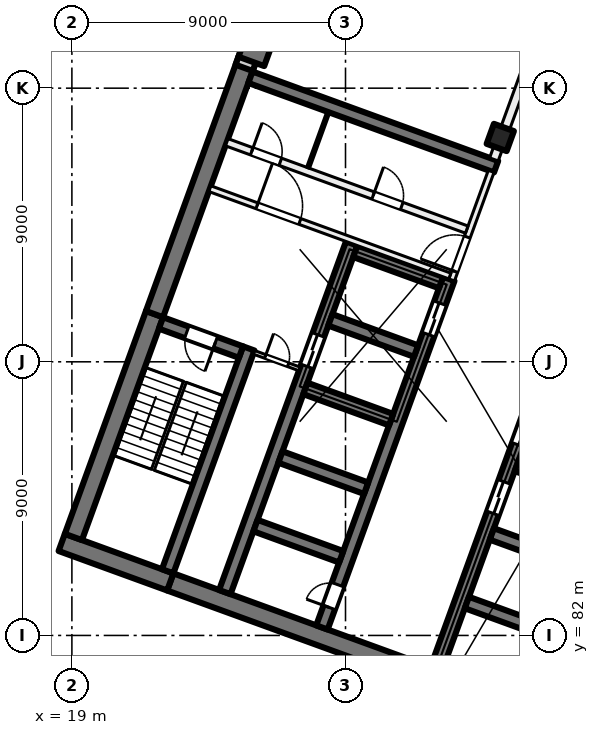
"""IFC4 building model, lengths in metres.
Left out: names, types, materials, properties, quantities, classifications, styles, units other than length and angle.
Written with IfcOpenShell. Run it as: python <this file> out.ifc"""

import sys

from ifc_helpers import new_model, si_unit, direction, frame, frame_2d, origin, origin_2d, place, context, subcontext, project, spatial, rectangle, extrude, element, fill, save


model = new_model("IFC4")
c1 = context("Model", 3, precision=1e-05, world=origin(), true_north=direction((0.0, 1.0)))
c2 = subcontext(c1, "Body", "Model", "MODEL_VIEW")
j1 = project(units=[si_unit("LENGTHUNIT", "METRE"), si_unit("PLANEANGLEUNIT", "RADIAN")], contexts=[c1])
p1 = place(None, origin())
s1 = spatial("IfcSite", under=j1, at=p1, CompositionType="ELEMENT")
p2 = place(p1, origin())
s2 = spatial("IfcBuilding", under=s1, at=p2, CompositionType="ELEMENT")
p3 = place(p2, frame((0.0, 0.0, 31.5)))
s3 = spatial("IfcBuildingStorey", under=s2, at=p3, CompositionType="ELEMENT", Elevation=31.5)
p4 = place(p3, frame((33.091, 98.379, 0.0), z_axis=(0.0, 0.0, 1.0), x_axis=(-0.342020143326, -0.939692620786, 0.0)))
e1 = element("IfcColumn", 1, at=p4, inside=s3, PredefinedType="COLUMN", context=c2, shape_type="SweptSolid", body=[
    extrude(rectangle(XDim=0.7, YDim=0.7, at=origin_2d()), origin(), (0.0, 0.0, 1.0), 4.0),
])
p5 = place(p3, frame((25.056, 101.303, 0.0), z_axis=(0.0, 0.0, 1.0), x_axis=(-0.342020143326, -0.939692620786, 0.0)))
e2 = element("IfcColumn", 2, at=p5, inside=s3, PredefinedType="COLUMN", context=c2, shape_type="SweptSolid", body=[
    extrude(rectangle(XDim=0.9, YDim=0.9, at=origin_2d()), origin(), (0.0, 0.0, 1.0), 4.0),
])
p6 = place(p3, frame((35.767, 78.835, 0.0), z_axis=(0.0, 0.0, 1.0), x_axis=(-0.939692894512, 0.342019391267, 0.0)))
e3 = element("IfcWall", 3, at=p6, inside=s3, PredefinedType="SHEAR", context=c2, shape_type="SweptSolid", body=[
    extrude(rectangle(XDim=14.4, YDim=0.6, at=frame_2d((7.2, 0.0))), origin(), (0.0, 0.0, 1.0), 4.0),
])
p7 = place(p3, frame((22.236, 83.76, 0.0), z_axis=(0.0, 0.0, 1.0), x_axis=(-0.939680822529, 0.342052557032, 0.0)))
e4 = element("IfcWall", 4, at=p7, inside=s3, PredefinedType="SHEAR", context=c2, shape_type="SweptSolid", body=[
    extrude(rectangle(XDim=3.8, YDim=0.6, at=frame_2d((1.9, 0.0))), origin(), (0.0, 0.0, 1.0), 4.0),
])
p8 = place(p3, frame((19.05, 85.239, 0.0), z_axis=(0.0, 0.0, 1.0), x_axis=(0.342016982193, 0.939693771338, 0.0)))
e5 = element("IfcWall", 5, at=p8, inside=s3, PredefinedType="SHEAR", context=c2, shape_type="SweptSolid", body=[
    extrude(rectangle(XDim=7.8, YDim=0.6, at=frame_2d((3.9, 0.0))), origin(), (0.0, 0.0, 1.0), 4.0),
])
p9 = place(p3, frame((21.717, 92.568, 0.0), z_axis=(0.0, 0.0, 1.0), x_axis=(0.342016162452, 0.939694069696, 0.0)))
e6 = element("IfcWall", 6, at=p9, inside=s3, PredefinedType="SHEAR", context=c2, shape_type="SweptSolid", body=[
    extrude(rectangle(XDim=8.9, YDim=0.6, at=frame_2d((4.45, 0.0))), origin(), (0.0, 0.0, 1.0), 4.0),
])
p10 = place(p3, frame((22.15, 84.11, 0.0), z_axis=(0.0, 0.0, 1.0), x_axis=(0.342016982193, 0.939693771338, 0.0)))
e7 = element("IfcWall", 7, at=p10, inside=s3, PredefinedType="SHEAR", context=c2, shape_type="SweptSolid", body=[
    extrude(rectangle(XDim=7.8, YDim=0.4, at=frame_2d((3.9, 0.0))), origin(), (0.0, 0.0, 1.0), 4.0),
])
p11 = place(p3, frame((24.562, 91.32, 0.0), z_axis=(0.0, 0.0, 1.0), x_axis=(-0.939717030584, 0.341953070509, 0.0)))
e8 = element("IfcWall", 8, at=p11, inside=s3, PredefinedType="SHEAR", context=c2, shape_type="SweptSolid", body=[
    extrude(rectangle(XDim=2.8, YDim=0.4, at=frame_2d((1.4, 0.0))), origin(), (0.0, 0.0, 1.0), 4.0),
])
p12 = place(p11, frame((0.9, 0.0, 0.0)))
e9 = element("IfcOpeningElement", 9, at=p12, cuts=e8, PredefinedType="OPENING", context=c2, shape_type="SweptSolid", body=[
    extrude(rectangle(XDim=1.0, YDim=2.1, at=frame_2d((0.5, 1.05))), frame((0.0, 0.21, 0.0), z_axis=(0.0, -1.0, 0.0), x_axis=(1.0, 0.0, 0.0)), (0.0, 0.0, 1.0), 0.42),
])
p13 = place(p3, frame((30.984, 80.895, 0.0), z_axis=(0.0, 0.0, 1.0), x_axis=(0.342021021735, 0.939692301071, 0.0)))
e10 = element("IfcWall", 10, at=p13, inside=s3, PredefinedType="SHEAR", context=c2, shape_type="SweptSolid", body=[
    extrude(rectangle(XDim=12.2, YDim=0.4, at=frame_2d((6.1, 0.0))), origin(), (0.0, 0.0, 1.0), 4.0),
])
p14 = place(p13, frame((5.45, 0.0, 0.0)))
e11 = element("IfcOpeningElement", 11, at=p14, cuts=e10, PredefinedType="OPENING", context=c2, shape_type="SweptSolid", body=[
    extrude(rectangle(XDim=1.1, YDim=2.1, at=frame_2d((0.55, 1.05))), frame((0.0, 0.21, 0.0), z_axis=(0.0, -1.0, 0.0), x_axis=(1.0, 0.0, 0.0)), (0.0, 0.0, 1.0), 0.42),
])
p15 = place(p13, frame((7.85, 0.0, 0.0)))
e12 = element("IfcOpeningElement", 12, at=p15, cuts=e10, PredefinedType="OPENING", context=c2, shape_type="SweptSolid", body=[
    extrude(rectangle(XDim=1.1, YDim=2.1, at=frame_2d((0.55, 1.05))), frame((0.0, 0.21, 0.0), z_axis=(0.0, -1.0, 0.0), x_axis=(1.0, 0.0, 0.0)), (0.0, 0.0, 1.0), 0.42),
])
p16 = place(p13, frame((10.25, 0.0, 0.0)))
e13 = element("IfcOpeningElement", 13, at=p16, cuts=e10, PredefinedType="OPENING", context=c2, shape_type="SweptSolid", body=[
    extrude(rectangle(XDim=1.1, YDim=2.1, at=frame_2d((0.55, 1.05))), frame((0.0, 0.21, 0.0), z_axis=(0.0, -1.0, 0.0), x_axis=(1.0, 0.0, 0.0)), (0.0, 0.0, 1.0), 0.42),
])
for number, where, z_axis, x_axis in (
    (14, (34.812, 82.056, 0.0), (0.0, 0.0, 1.0), (-0.94, 0.342, 0.0)),
    (15, (35.632, 84.311, 0.0), (0.0, 0.0, 1.0), (-0.94, 0.342, 0.0)),
    (16, (36.453, 86.566, 0.0), (0.0, 0.0, 1.0), (-0.94, 0.342, 0.0)),
):
    element("IfcWall", number, at=place(p3, frame(where, z_axis=z_axis, x_axis=x_axis)), inside=s3, PredefinedType="SHEAR", context=c2, shape_type="SweptSolid", body=[
        extrude(rectangle(XDim=3.0, YDim=0.4, at=frame_2d((1.5, 0.0))), origin(), (0.0, 0.0, 1.0), 4.0),
    ])
p17 = place(p3, frame((27.225, 82.263, 0.0), z_axis=(0.0, 0.0, 1.0), x_axis=(0.342014590177, 0.939694641948, 0.0)))
e17 = element("IfcWall", 17, at=p17, inside=s3, PredefinedType="SHEAR", context=c2, shape_type="SweptSolid", body=[
    extrude(rectangle(XDim=12.2, YDim=0.4, at=frame_2d((6.1, 0.0))), origin(), (0.0, 0.0, 1.0), 4.0),
])
p18 = place(p17, frame((10.25, 0.0, 0.0)))
e18 = element("IfcOpeningElement", 18, at=p18, cuts=e17, PredefinedType="OPENING", context=c2, shape_type="SweptSolid", body=[
    extrude(rectangle(XDim=1.1, YDim=2.1, at=frame_2d((0.55, 1.05))), frame((0.0, 0.21, 0.0), z_axis=(0.0, -1.0, 0.0), x_axis=(1.0, 0.0, 0.0)), (0.0, 0.0, 1.0), 0.42),
])
p19 = place(p17, frame((0.7, 0.0, 0.0)))
e19 = element("IfcOpeningElement", 19, at=p19, cuts=e17, PredefinedType="OPENING", context=c2, shape_type="SweptSolid", body=[
    extrude(rectangle(XDim=0.8, YDim=2.1, at=frame_2d((0.4, 1.05))), frame((0.0, 0.21, 0.0), z_axis=(0.0, -1.0, 0.0), x_axis=(1.0, 0.0, 0.0)), (0.0, 0.0, 1.0), 0.42),
])
p20 = place(p3, frame((24.03, 83.426, 0.0), z_axis=(0.0, 0.0, 1.0), x_axis=(0.342014590177, 0.939694641948, 0.0)))
e20 = element("IfcWall", 20, at=p20, inside=s3, PredefinedType="SHEAR", context=c2, shape_type="SweptSolid", body=[
    extrude(rectangle(XDim=12.2, YDim=0.4, at=frame_2d((6.1, 0.0))), origin(), (0.0, 0.0, 1.0), 4.0),
])
p21 = place(p20, frame((7.9, 0.0, 0.0)))
e21 = element("IfcOpeningElement", 21, at=p21, cuts=e20, PredefinedType="OPENING", context=c2, shape_type="SweptSolid", body=[
    extrude(rectangle(XDim=1.1, YDim=2.1, at=frame_2d((0.55, 1.05))), frame((0.0, 0.21, 0.0), z_axis=(0.0, -1.0, 0.0), x_axis=(1.0, 0.0, 0.0)), (0.0, 0.0, 1.0), 0.42),
])
p22 = place(p3, frame((27.858, 84.587, 0.0), z_axis=(0.0, 0.0, 1.0), x_axis=(-0.939686455819, 0.342037080957, 0.0)))
e22 = element("IfcWall", 22, at=p22, inside=s3, PredefinedType="SHEAR", context=c2, shape_type="SweptSolid", body=[
    extrude(rectangle(XDim=3.0, YDim=0.4, at=frame_2d((1.5, 0.0))), origin(), (0.0, 0.0, 1.0), 4.0),
])
p23 = place(p3, frame((28.678, 86.842, 0.0), z_axis=(0.0, 0.0, 1.0), x_axis=(-0.939676934218, 0.342063238742, 0.0)))
e23 = element("IfcWall", 23, at=p23, inside=s3, PredefinedType="SHEAR", context=c2, shape_type="SweptSolid", body=[
    extrude(rectangle(XDim=3.0, YDim=0.4, at=frame_2d((1.5, 0.0))), origin(), (0.0, 0.0, 1.0), 4.0),
])
for number, where, z_axis, x_axis in (
    (24, (29.5, 89.097, 0.0), (0.0, 0.0, 1.0), (-0.94, 0.342, 0.0)),
    (25, (30.32, 91.353, 0.0), (0.0, 0.0, 1.0), (-0.94, 0.342, 0.0)),
    (26, (31.141, 93.608, 0.0), (0.0, 0.0, 1.0), (-0.94, 0.342, 0.0)),
):
    element("IfcWall", number, at=place(p3, frame(where, z_axis=z_axis, x_axis=x_axis)), inside=s3, PredefinedType="SHEAR", context=c2, shape_type="SweptSolid", body=[
        extrude(rectangle(XDim=3.0, YDim=0.4, at=frame_2d((1.5, 0.0))), origin(), (0.0, 0.0, 1.0), 4.0),
    ])
p24 = place(p3, frame((32.953, 97.418, 0.0), z_axis=(0.0, 0.0, 1.0), x_axis=(-0.93969060187, 0.342025690201, 0.0)))
e27 = element("IfcWall", 27, at=p24, inside=s3, PredefinedType="SHEAR", context=c2, shape_type="SweptSolid", body=[
    extrude(rectangle(XDim=8.6, YDim=0.4, at=frame_2d((4.3, 0.0))), origin(), (0.0, 0.0, 1.0), 4.0),
])
p25 = place(p3, frame((24.666, 100.669, 0.0), z_axis=(0.0, 0.0, 1.0), x_axis=(0.34201964167, 0.939692803373, 0.0)))
e28 = element("IfcWall", 28, at=p25, inside=s3, PredefinedType="SOLIDWALL", context=c2, shape_type="SweptSolid", body=[
    extrude(rectangle(XDim=32.884, YDim=0.6, at=frame_2d((16.442, 0.0))), origin(), (0.0, 0.0, 1.0), 3.625),
])
p26 = place(p25, frame((1.48, 0.0, 0.9)))
e29 = element("IfcOpeningElement", 29, at=p26, cuts=e28, PredefinedType="OPENING", context=c2, shape_type="SweptSolid", body=[
    extrude(rectangle(XDim=3.0, YDim=2.4, at=frame_2d((1.5, 1.2))), frame((0.0, 0.31, 0.0), z_axis=(0.0, -1.0, 0.0), x_axis=(1.0, 0.0, 0.0)), (0.0, 0.0, 1.0), 0.62),
])
p27 = place(p25, frame((5.98, 0.0, 0.9)))
e30 = element("IfcOpeningElement", 30, at=p27, cuts=e28, PredefinedType="OPENING", context=c2, shape_type="SweptSolid", body=[
    extrude(rectangle(XDim=3.0, YDim=2.4, at=frame_2d((1.5, 1.2))), frame((0.0, 0.31, 0.0), z_axis=(0.0, -1.0, 0.0), x_axis=(1.0, 0.0, 0.0)), (0.0, 0.0, 1.0), 0.62),
])
p28 = place(p25, frame((11.08, 0.0, 0.0)))
e31 = element("IfcOpeningElement", 31, at=p28, cuts=e28, PredefinedType="OPENING", context=c2, shape_type="SweptSolid", body=[
    extrude(rectangle(XDim=1.8, YDim=2.4, at=frame_2d((0.9, 1.2))), frame((0.0, 0.31, 0.0), z_axis=(0.0, -1.0, 0.0), x_axis=(1.0, 0.0, 0.0)), (0.0, 0.0, 1.0), 0.62),
])
p29 = place(p25, frame((14.98, 0.0, 0.9)))
e32 = element("IfcOpeningElement", 32, at=p29, cuts=e28, PredefinedType="OPENING", context=c2, shape_type="SweptSolid", body=[
    extrude(rectangle(XDim=3.0, YDim=2.4, at=frame_2d((1.5, 1.2))), frame((0.0, 0.31, 0.0), z_axis=(0.0, -1.0, 0.0), x_axis=(1.0, 0.0, 0.0)), (0.0, 0.0, 1.0), 0.62),
])
p30 = place(p25, frame((19.48, 0.0, 0.9)))
e33 = element("IfcOpeningElement", 33, at=p30, cuts=e28, PredefinedType="OPENING", context=c2, shape_type="SweptSolid", body=[
    extrude(rectangle(XDim=3.0, YDim=2.4, at=frame_2d((1.5, 1.2))), frame((0.0, 0.31, 0.0), z_axis=(0.0, -1.0, 0.0), x_axis=(1.0, 0.0, 0.0)), (0.0, 0.0, 1.0), 0.62),
])
p31 = place(p25, frame((24.58, 0.0, 0.0)))
e34 = element("IfcOpeningElement", 34, at=p31, cuts=e28, PredefinedType="OPENING", context=c2, shape_type="SweptSolid", body=[
    extrude(rectangle(XDim=1.8, YDim=2.4, at=frame_2d((0.9, 1.2))), frame((0.0, 0.31, 0.0), z_axis=(0.0, -1.0, 0.0), x_axis=(1.0, 0.0, 0.0)), (0.0, 0.0, 1.0), 0.62),
])
p32 = place(p25, frame((28.48, 0.0, 0.9)))
e35 = element("IfcOpeningElement", 35, at=p32, cuts=e28, PredefinedType="OPENING", context=c2, shape_type="SweptSolid", body=[
    extrude(rectangle(XDim=3.0, YDim=2.4, at=frame_2d((1.5, 1.2))), frame((0.0, 0.31, 0.0), z_axis=(0.0, -1.0, 0.0), x_axis=(1.0, 0.0, 0.0)), (0.0, 0.0, 1.0), 0.62),
])
p33 = place(p3, frame((31.491, 93.693, 0.0), z_axis=(0.0, 0.0, 1.0), x_axis=(0.341995824804, 0.939701471648, 0.0)))
e36 = element("IfcWall", 36, at=p33, inside=s3, PredefinedType="PARTITIONING", context=c2, shape_type="SweptSolid", body=[
    extrude(rectangle(XDim=3.8, YDim=0.2, at=frame_2d((1.9, 0.0))), origin(), (0.0, 0.0, 1.0), 3.625),
])
p34 = place(p33, frame((0.3, 0.0, 0.0)))
e37 = element("IfcOpeningElement", 37, at=p34, cuts=e36, PredefinedType="OPENING", context=c2, shape_type="SweptSolid", body=[
    extrude(rectangle(XDim=1.2, YDim=2.1, at=frame_2d((0.6, 1.05))), frame((0.0, 0.11, 0.0), z_axis=(0.0, -1.0, 0.0), x_axis=(1.0, 0.0, 0.0)), (0.0, 0.0, 1.0), 0.22),
])
p35 = place(p3, frame((23.538, 96.694, 0.0), z_axis=(0.0, 0.0, 1.0), x_axis=(0.939691552312, -0.342023078919, 0.0)))
e38 = element("IfcWall", 38, at=p35, inside=s3, PredefinedType="PARTITIONING", context=c2, shape_type="SweptSolid", body=[
    extrude(rectangle(XDim=8.4, YDim=0.2, at=frame_2d((4.2, 0.0))), origin(), (0.0, 0.0, 1.0), 3.625),
])
p36 = place(p35, frame((1.65, 0.0, 0.0)))
e39 = element("IfcOpeningElement", 39, at=p36, cuts=e38, PredefinedType="OPENING", context=c2, shape_type="SweptSolid", body=[
    extrude(rectangle(XDim=1.5, YDim=2.1, at=frame_2d((0.75, 1.05))), frame((0.0, 0.11, 0.0), z_axis=(0.0, -1.0, 0.0), x_axis=(1.0, 0.0, 0.0)), (0.0, 0.0, 1.0), 0.22),
])
p37 = place(p3, frame((24.094, 98.221, 0.0), z_axis=(0.0, 0.0, 1.0), x_axis=(0.939691552312, -0.342023078919, 0.0)))
e40 = element("IfcWall", 40, at=p37, inside=s3, PredefinedType="PARTITIONING", context=c2, shape_type="SweptSolid", body=[
    extrude(rectangle(XDim=8.4, YDim=0.25, at=frame_2d((4.2, 0.0))), origin(), (0.0, 0.0, 1.0), 3.625),
])
p38 = place(p37, frame((5.125, 0.0, 0.0)))
e41 = element("IfcOpeningElement", 41, at=p38, cuts=e40, PredefinedType="OPENING", context=c2, shape_type="SweptSolid", body=[
    extrude(rectangle(XDim=1.0, YDim=2.1, at=frame_2d((0.5, 1.05))), frame((0.0, 0.135, 0.0), z_axis=(0.0, -1.0, 0.0), x_axis=(1.0, 0.0, 0.0)), (0.0, 0.0, 1.0), 0.27),
])
p39 = place(p37, frame((0.875, 0.0, 0.0)))
e42 = element("IfcOpeningElement", 42, at=p39, cuts=e40, PredefinedType="OPENING", context=c2, shape_type="SweptSolid", body=[
    extrude(rectangle(XDim=1.0, YDim=2.1, at=frame_2d((0.5, 1.05))), frame((0.0, 0.135, 0.0), z_axis=(0.0, -1.0, 0.0), x_axis=(1.0, 0.0, 0.0)), (0.0, 0.0, 1.0), 0.27),
])
p40 = place(p3, frame((24.985, 91.312, 0.0), z_axis=(0.0, 0.0, 1.0), x_axis=(0.939708740826, -0.341975850632, 0.0)))
e43 = element("IfcWall", 43, at=p40, inside=s3, PredefinedType="PARTITIONING", context=c2, shape_type="SweptSolid", body=[
    extrude(rectangle(XDim=1.6, YDim=0.125, at=frame_2d((0.8, 0.0))), origin(), (0.0, 0.0, 1.0), 3.625),
])
p41 = place(p40, frame((0.4, 0.0, 0.0)))
e44 = element("IfcOpeningElement", 44, at=p41, cuts=e43, PredefinedType="OPENING", context=c2, shape_type="SweptSolid", body=[
    extrude(rectangle(XDim=0.8, YDim=2.1, at=frame_2d((0.4, 1.05))), frame((0.0, 0.073, 0.0), z_axis=(0.0, -1.0, 0.0), x_axis=(1.0, 0.0, 0.0)), (0.0, 0.0, 1.0), 0.145),
])
p42 = place(p3, frame((26.768, 97.381, 0.0), z_axis=(0.0, 0.0, 1.0), x_axis=(0.342024501273, 0.939691034611, 0.0)))
e45 = element("IfcWall", 45, at=p42, inside=s3, PredefinedType="PARTITIONING", context=c2, shape_type="SweptSolid", body=[
    extrude(rectangle(XDim=1.95, YDim=0.1, at=frame_2d((0.975, 0.0))), origin(), (0.0, 0.0, 1.0), 3.625),
])
p43 = place(p3, frame((32.881, 97.657, 0.0), z_axis=(0.0, 0.0, 1.0), x_axis=(0.342017360004, 0.939693633828, 0.0)))
e46 = element("IfcWall", 46, at=p43, inside=s3, PredefinedType="PARTITIONING", context=c2, shape_type="SweptSolid", body=[
    extrude(rectangle(XDim=34.516, YDim=0.3, at=frame_2d((17.258, 0.0))), origin(), (0.0, 0.0, 1.0), 3.625),
])
p44 = place(p43, frame((6.225, 0.0, 0.0)))
e47 = element("IfcOpeningElement", 47, at=p44, cuts=e46, PredefinedType="OPENING", context=c2, shape_type="SweptSolid", body=[
    extrude(rectangle(XDim=1.8, YDim=2.1, at=frame_2d((0.9, 1.05))), frame((0.0, 0.16, 0.0), z_axis=(0.0, -1.0, 0.0), x_axis=(1.0, 0.0, 0.0)), (0.0, 0.0, 1.0), 0.32),
])
p45 = place(p43, frame((15.9, 0.0, 0.0)))
e48 = element("IfcOpeningElement", 48, at=p45, cuts=e46, PredefinedType="OPENING", context=c2, shape_type="SweptSolid", body=[
    extrude(rectangle(XDim=1.2, YDim=2.1, at=frame_2d((0.6, 1.05))), frame((0.0, 0.16, 0.0), z_axis=(0.0, -1.0, 0.0), x_axis=(1.0, 0.0, 0.0)), (0.0, 0.0, 1.0), 0.32),
])
p46 = place(p43, frame((20.5, 0.0, 0.0)))
e49 = element("IfcOpeningElement", 49, at=p46, cuts=e46, PredefinedType="OPENING", context=c2, shape_type="SweptSolid", body=[
    extrude(rectangle(XDim=1.0, YDim=2.1, at=frame_2d((0.5, 1.05))), frame((0.0, 0.16, 0.0), z_axis=(0.0, -1.0, 0.0), x_axis=(1.0, 0.0, 0.0)), (0.0, 0.0, 1.0), 0.32),
])
p47 = place(p43, frame((25.0, 0.0, 0.0)))
e50 = element("IfcOpeningElement", 50, at=p47, cuts=e46, PredefinedType="OPENING", context=c2, shape_type="SweptSolid", body=[
    extrude(rectangle(XDim=1.0, YDim=2.1, at=frame_2d((0.5, 1.05))), frame((0.0, 0.16, 0.0), z_axis=(0.0, -1.0, 0.0), x_axis=(1.0, 0.0, 0.0)), (0.0, 0.0, 1.0), 0.32),
])
p48 = place(p43, frame((30.562, 0.0, 0.0)))
e51 = element("IfcOpeningElement", 51, at=p48, cuts=e46, PredefinedType="OPENING", context=c2, shape_type="SweptSolid", body=[
    extrude(rectangle(XDim=1.0, YDim=2.1, at=frame_2d((0.5, 1.05))), frame((0.0, 0.16, 0.0), z_axis=(0.0, -1.0, 0.0), x_axis=(1.0, 0.0, 0.0)), (0.0, 0.0, 1.0), 0.32),
])
p49 = place(p18, origin())
e52 = element("IfcDoor", 52, at=p49, inside=s3, OperationType="DOUBLE_DOOR_SLIDING", PredefinedType="DOOR", context=c2, shape_type="SweptSolid", body=[
    extrude(rectangle(XDim=1.1, YDim=2.1, at=frame_2d((0.55, 1.05))), frame((0.0, 0.025, 0.0), z_axis=(0.0, -1.0, 0.0), x_axis=(1.0, 0.0, 0.0)), (0.0, 0.0, 1.0), 0.05),
])
fill(e18, e52)
p50 = place(p14, origin())
e53 = element("IfcDoor", 53, at=p50, inside=s3, OperationType="DOUBLE_DOOR_SLIDING", PredefinedType="DOOR", context=c2, shape_type="SweptSolid", body=[
    extrude(rectangle(XDim=1.1, YDim=2.1, at=frame_2d((0.55, 1.05))), frame((0.0, 0.025, 0.0), z_axis=(0.0, -1.0, 0.0), x_axis=(1.0, 0.0, 0.0)), (0.0, 0.0, 1.0), 0.05),
])
fill(e11, e53)
p51 = place(p15, origin())
e54 = element("IfcDoor", 54, at=p51, inside=s3, OperationType="DOUBLE_DOOR_SLIDING", PredefinedType="DOOR", context=c2, shape_type="SweptSolid", body=[
    extrude(rectangle(XDim=1.1, YDim=2.1, at=frame_2d((0.55, 1.05))), frame((0.0, 0.025, 0.0), z_axis=(0.0, -1.0, 0.0), x_axis=(1.0, 0.0, 0.0)), (0.0, 0.0, 1.0), 0.05),
])
fill(e12, e54)
p52 = place(p19, origin())
e55 = element("IfcDoor", 55, at=p52, inside=s3, OperationType="SINGLE_SWING_LEFT", PredefinedType="DOOR", context=c2, shape_type="SweptSolid", body=[
    extrude(rectangle(XDim=0.8, YDim=2.1, at=frame_2d((0.4, 1.05))), frame((0.0, 0.025, 0.0), z_axis=(0.0, -1.0, 0.0), x_axis=(1.0, 0.0, 0.0)), (0.0, 0.0, 1.0), 0.05),
])
fill(e19, e55)
p53 = place(p34, origin())
e56 = element("IfcDoor", 56, at=p53, inside=s3, OperationType="DOUBLE_DOOR_SINGLE_SWING", PredefinedType="DOOR", context=c2, shape_type="SweptSolid", body=[
    extrude(rectangle(XDim=1.2, YDim=2.1, at=frame_2d((0.6, 1.05))), frame((0.0, 0.025, 0.0), z_axis=(0.0, -1.0, 0.0), x_axis=(1.0, 0.0, 0.0)), (0.0, 0.0, 1.0), 0.05),
])
fill(e37, e56)
p54 = place(p36, origin())
e57 = element("IfcDoor", 57, at=p54, inside=s3, OperationType="DOUBLE_DOOR_SINGLE_SWING", PredefinedType="DOOR", context=c2, shape_type="SweptSolid", body=[
    extrude(rectangle(XDim=1.5, YDim=2.1, at=frame_2d((0.75, 1.05))), frame((0.0, 0.025, 0.0), z_axis=(0.0, -1.0, 0.0), x_axis=(1.0, 0.0, 0.0)), (0.0, 0.0, 1.0), 0.05),
])
fill(e39, e57)
p55 = place(p12, origin())
e58 = element("IfcDoor", 58, at=p55, inside=s3, OperationType="SINGLE_SWING_LEFT", PredefinedType="DOOR", context=c2, shape_type="SweptSolid", body=[
    extrude(rectangle(XDim=1.0, YDim=2.1, at=frame_2d((0.5, 1.05))), frame((0.0, 0.025, 0.0), z_axis=(0.0, -1.0, 0.0), x_axis=(1.0, 0.0, 0.0)), (0.0, 0.0, 1.0), 0.05),
])
fill(e9, e58)
p56 = place(p41, origin())
e59 = element("IfcDoor", 59, at=p56, inside=s3, OperationType="SINGLE_SWING_RIGHT", PredefinedType="DOOR", context=c2, shape_type="SweptSolid", body=[
    extrude(rectangle(XDim=0.8, YDim=2.1, at=frame_2d((0.4, 1.05))), frame((0.0, 0.025, 0.0), z_axis=(0.0, -1.0, 0.0), x_axis=(1.0, 0.0, 0.0)), (0.0, 0.0, 1.0), 0.05),
])
fill(e44, e59)
p57 = place(p38, origin())
e60 = element("IfcDoor", 60, at=p57, inside=s3, OperationType="SINGLE_SWING_LEFT", PredefinedType="DOOR", context=c2, shape_type="SweptSolid", body=[
    extrude(rectangle(XDim=1.0, YDim=2.1, at=frame_2d((0.5, 1.05))), frame((0.0, 0.025, 0.0), z_axis=(0.0, -1.0, 0.0), x_axis=(1.0, 0.0, 0.0)), (0.0, 0.0, 1.0), 0.05),
])
fill(e41, e60)
p58 = place(p39, origin())
e61 = element("IfcDoor", 61, at=p58, inside=s3, OperationType="SINGLE_SWING_RIGHT", PredefinedType="DOOR", context=c2, shape_type="SweptSolid", body=[
    extrude(rectangle(XDim=1.0, YDim=2.1, at=frame_2d((0.5, 1.05))), frame((0.0, 0.025, 0.0), z_axis=(0.0, -1.0, 0.0), x_axis=(1.0, 0.0, 0.0)), (0.0, 0.0, 1.0), 0.05),
])
fill(e42, e61)
p59 = place(p21, origin())
e62 = element("IfcDoor", 62, at=p59, inside=s3, OperationType="DOUBLE_DOOR_SLIDING", PredefinedType="DOOR", context=c2, shape_type="SweptSolid", body=[
    extrude(rectangle(XDim=1.1, YDim=2.1, at=frame_2d((0.55, 1.05))), frame((0.0, 0.025, 0.0), z_axis=(0.0, -1.0, 0.0), x_axis=(1.0, 0.0, 0.0)), (0.0, 0.0, 1.0), 0.05),
])
fill(e21, e62)
save(model, sys.argv[1])
